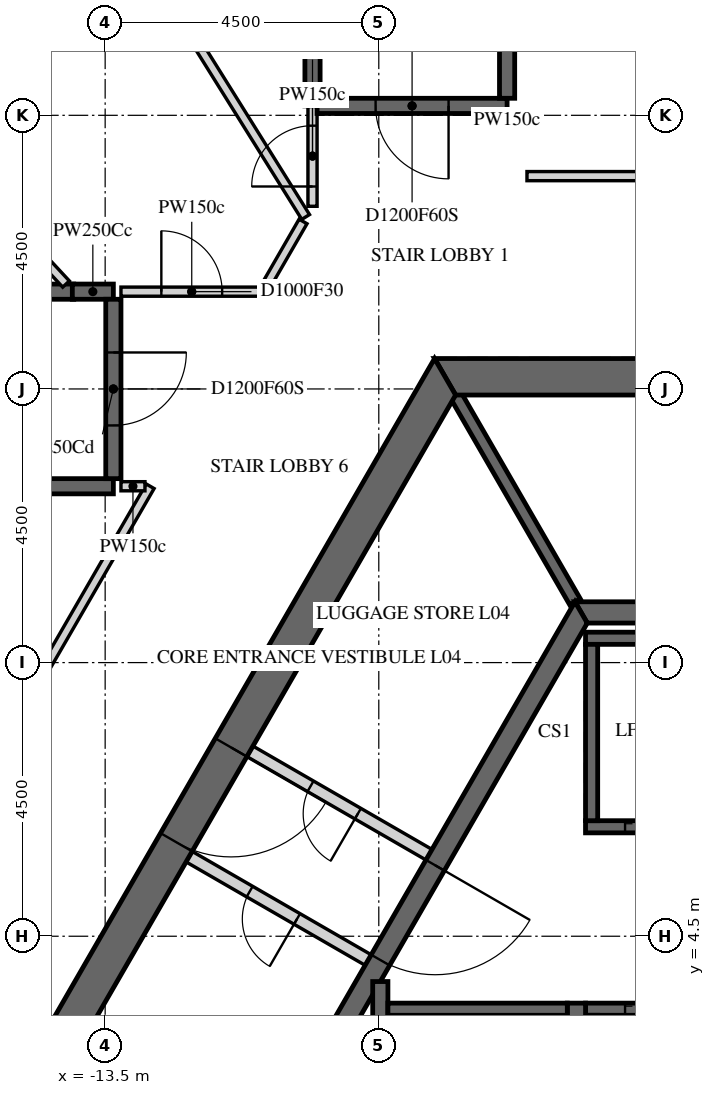
"""IFC4 building model, lengths in metres.
Left out: names, types, materials, properties, quantities, classifications, styles, units other than length and angle.
Written with IfcOpenShell. Run it as: python <this file> out.ifc"""

import sys

from ifc_helpers import new_model, si_unit, direction, frame, frame_2d, origin, place, context, subcontext, project, spatial, polyline, rectangle, outline, extrude, element, fill, save


model = new_model("IFC4")
c1 = context("Model", 3, precision=1e-05, world=origin(), true_north=direction((0.0, 1.0)))
c2 = subcontext(c1, "Body", "Model", "MODEL_VIEW")
j1 = project(units=[si_unit("LENGTHUNIT", "METRE"), si_unit("PLANEANGLEUNIT", "RADIAN")], contexts=[c1])
p1 = place(None, origin())
s1 = spatial("IfcSite", under=j1, at=p1, CompositionType="ELEMENT")
p2 = place(p1, origin())
s2 = spatial("IfcBuilding", under=s1, at=p2, CompositionType="ELEMENT")
p3 = place(p2, frame((0.0, 0.0, 26.0)))
s3 = spatial("IfcBuildingStorey", under=s2, at=p3, CompositionType="ELEMENT", Elevation=26.0)
p4 = place(p3, frame((-7.91, 13.7, -0.25), z_axis=(0.0, 0.0, 1.0), x_axis=(-0.499999880136, -0.866025472988, 0.0)))
e1 = element("IfcWall", 1, at=p4, inside=s3, PredefinedType="SHEAR", context=c2, shape_type="SweptSolid", body=[
    extrude(outline(polyline([(-0.173, -0.3), (15.993, -0.3), (15.646, 0.3), (0.173, 0.3), (-0.173, -0.3)])), origin(), (0.0, 0.0, 1.0), 5.45),
])
p5 = place(p4, frame((7.039, 0.0, 0.25)))
e2 = element("IfcOpeningElement", 2, at=p5, cuts=e1, PredefinedType="OPENING", context=c2, shape_type="SweptSolid", body=[
    extrude(rectangle(XDim=1.8, YDim=2.4, at=frame_2d((0.9, 1.2))), frame((0.0, 0.31, 0.0), z_axis=(0.0, -1.0, 0.0), x_axis=(1.0, 0.0, 0.0)), (0.0, 0.0, 1.0), 0.62),
])
p6 = place(p3, frame((7.91, 13.7, -0.25), z_axis=(0.0, 0.0, 1.0), x_axis=(-1.0, 0.0, 0.0)))
e3 = element("IfcWall", 3, at=p6, inside=s3, PredefinedType="SHEAR", context=c2, shape_type="SweptSolid", body=[
    extrude(outline(polyline([(-0.173, -0.3), (15.993, -0.3), (15.646, 0.3), (0.173, 0.3), (-0.173, -0.3)])), origin(), (0.0, 0.0, 1.0), 5.45),
])
p7 = place(p6, frame((7.31, 0.0, 0.25)))
e4 = element("IfcOpeningElement", 4, at=p7, cuts=e3, PredefinedType="OPENING", context=c2, shape_type="SweptSolid", body=[
    extrude(rectangle(XDim=1.2, YDim=2.4, at=frame_2d((0.6, 1.2))), frame((0.0, 0.31, 0.0), z_axis=(0.0, -1.0, 0.0), x_axis=(1.0, 0.0, 0.0)), (0.0, 0.0, 1.0), 0.62),
])
p8 = place(p3, frame((-5.673, 9.825, -0.25), z_axis=(0.0, 0.0, 1.0), x_axis=(-0.499995046907, -0.866028263435, 0.0)))
e5 = element("IfcWall", 5, at=p8, inside=s3, PredefinedType="SHEAR", context=c2, shape_type="SweptSolid", body=[
    extrude(outline(polyline([(-0.101, -0.175), (11.446, -0.175), (11.244, 0.175), (0.101, 0.175), (-0.101, -0.175)])), origin(), (0.0, 0.0, 1.0), 5.45),
])
p9 = place(p8, frame((4.801, 0.0, 0.25)))
e6 = element("IfcOpeningElement", 6, at=p9, cuts=e5, PredefinedType="OPENING", context=c2, shape_type="SweptSolid", body=[
    extrude(rectangle(XDim=1.8, YDim=2.4, at=frame_2d((0.9, 1.2))), frame((0.0, 0.185, 0.0), z_axis=(0.0, -1.0, 0.0), x_axis=(1.0, 0.0, 0.0)), (0.0, 0.0, 1.0), 0.37),
])
p10 = place(p3, frame((5.673, 9.825, -0.25), z_axis=(0.0, 0.0, 1.0), x_axis=(-1.0, 0.0, 0.0)))
e7 = element("IfcWall", 7, at=p10, inside=s3, PredefinedType="SHEAR", context=c2, shape_type="SweptSolid", body=[
    extrude(outline(polyline([(-0.101, -0.175), (11.446, -0.175), (11.244, 0.175), (0.101, 0.175), (-0.101, -0.175)])), origin(), (0.0, 0.0, 1.0), 5.45),
])
p11 = place(p3, frame((-5.6, 6.3, -0.25), z_axis=(0.0, 0.0, 1.0), x_axis=(1.0, 0.0, 0.0)))
e8 = element("IfcWall", 8, at=p11, inside=s3, PredefinedType="SHEAR", context=c2, shape_type="SweptSolid", body=[
    extrude(rectangle(XDim=11.2, YDim=0.2, at=frame_2d((5.6, 0.0))), origin(), (0.0, 0.0, 1.0), 5.5),
])
p12 = place(p11, frame((0.65, 0.0, 0.25)))
e9 = element("IfcOpeningElement", 9, at=p12, cuts=e8, PredefinedType="OPENING", context=c2, shape_type="SweptSolid", body=[
    extrude(rectangle(XDim=1.1, YDim=2.1, at=frame_2d((0.55, 1.05))), frame((0.0, 0.11, 0.0), z_axis=(0.0, -1.0, 0.0), x_axis=(1.0, 0.0, 0.0)), (0.0, 0.0, 1.0), 0.22),
])
p13 = place(p11, frame((2.85, 0.0, 0.25)))
e10 = element("IfcOpeningElement", 10, at=p13, cuts=e8, PredefinedType="OPENING", context=c2, shape_type="SweptSolid", body=[
    extrude(rectangle(XDim=1.1, YDim=2.1, at=frame_2d((0.55, 1.05))), frame((0.0, 0.11, 0.0), z_axis=(0.0, -1.0, 0.0), x_axis=(1.0, 0.0, 0.0)), (0.0, 0.0, 1.0), 0.22),
])
p14 = place(p11, frame((5.05, 0.0, 0.25)))
e11 = element("IfcOpeningElement", 11, at=p14, cuts=e8, PredefinedType="OPENING", context=c2, shape_type="SweptSolid", body=[
    extrude(rectangle(XDim=1.1, YDim=2.1, at=frame_2d((0.55, 1.05))), frame((0.0, 0.11, 0.0), z_axis=(0.0, -1.0, 0.0), x_axis=(1.0, 0.0, 0.0)), (0.0, 0.0, 1.0), 0.22),
])
p15 = place(p11, frame((7.25, 0.0, 0.25)))
e12 = element("IfcOpeningElement", 12, at=p15, cuts=e8, PredefinedType="OPENING", context=c2, shape_type="SweptSolid", body=[
    extrude(rectangle(XDim=1.1, YDim=2.1, at=frame_2d((0.55, 1.05))), frame((0.0, 0.11, 0.0), z_axis=(0.0, -1.0, 0.0), x_axis=(1.0, 0.0, 0.0)), (0.0, 0.0, 1.0), 0.22),
])
p16 = place(p11, frame((9.45, 0.0, 0.25)))
e13 = element("IfcOpeningElement", 13, at=p16, cuts=e8, PredefinedType="OPENING", context=c2, shape_type="SweptSolid", body=[
    extrude(rectangle(XDim=1.1, YDim=2.1, at=frame_2d((0.55, 1.05))), frame((0.0, 0.11, 0.0), z_axis=(0.0, -1.0, 0.0), x_axis=(1.0, 0.0, 0.0)), (0.0, 0.0, 1.0), 0.22),
])
p17 = place(p3, frame((-5.6, 9.4, -0.25), z_axis=(0.0, 0.0, 1.0), x_axis=(1.0, 0.0, 0.0)))
e14 = element("IfcWall", 14, at=p17, inside=s3, PredefinedType="SHEAR", context=c2, shape_type="SweptSolid", body=[
    extrude(rectangle(XDim=11.2, YDim=0.2, at=frame_2d((5.6, 0.0))), origin(), (0.0, 0.0, 1.0), 5.5),
])
p18 = place(p3, frame((-5.5, 6.4, -0.25), z_axis=(0.0, 0.0, 1.0), x_axis=(0.0, 1.0, 0.0)))
e15 = element("IfcWall", 15, at=p18, inside=s3, PredefinedType="SHEAR", context=c2, shape_type="SweptSolid", body=[
    extrude(rectangle(XDim=2.9, YDim=0.2, at=frame_2d((1.45, 0.0))), origin(), (0.0, 0.0, 1.0), 5.5),
])
p19 = place(p3, frame((-5.6, 3.3, -0.25), z_axis=(0.0, 0.0, 1.0), x_axis=(1.0, 0.0, 0.0)))
e16 = element("IfcWall", 16, at=p19, inside=s3, PredefinedType="SHEAR", context=c2, shape_type="SweptSolid", body=[
    extrude(rectangle(XDim=11.2, YDim=0.2, at=frame_2d((5.6, 0.0))), origin(), (0.0, 0.0, 1.0), 5.5),
])
p20 = place(p19, frame((0.65, 0.0, 0.25)))
e17 = element("IfcOpeningElement", 17, at=p20, cuts=e16, PredefinedType="OPENING", context=c2, shape_type="SweptSolid", body=[
    extrude(rectangle(XDim=1.1, YDim=2.1, at=frame_2d((0.55, 1.05))), frame((0.0, 0.11, 0.0), z_axis=(0.0, -1.0, 0.0), x_axis=(1.0, 0.0, 0.0)), (0.0, 0.0, 1.0), 0.22),
])
p21 = place(p19, frame((2.85, 0.0, 0.25)))
e18 = element("IfcOpeningElement", 18, at=p21, cuts=e16, PredefinedType="OPENING", context=c2, shape_type="SweptSolid", body=[
    extrude(rectangle(XDim=1.1, YDim=2.1, at=frame_2d((0.55, 1.05))), frame((0.0, 0.11, 0.0), z_axis=(0.0, -1.0, 0.0), x_axis=(1.0, 0.0, 0.0)), (0.0, 0.0, 1.0), 0.22),
])
p22 = place(p19, frame((5.05, 0.0, 0.25)))
e19 = element("IfcOpeningElement", 19, at=p22, cuts=e16, PredefinedType="OPENING", context=c2, shape_type="SweptSolid", body=[
    extrude(rectangle(XDim=1.1, YDim=2.1, at=frame_2d((0.55, 1.05))), frame((0.0, 0.11, 0.0), z_axis=(0.0, -1.0, 0.0), x_axis=(1.0, 0.0, 0.0)), (0.0, 0.0, 1.0), 0.22),
])
p23 = place(p19, frame((7.25, 0.0, 0.25)))
e20 = element("IfcOpeningElement", 20, at=p23, cuts=e16, PredefinedType="OPENING", context=c2, shape_type="SweptSolid", body=[
    extrude(rectangle(XDim=1.1, YDim=2.1, at=frame_2d((0.55, 1.05))), frame((0.0, 0.11, 0.0), z_axis=(0.0, -1.0, 0.0), x_axis=(1.0, 0.0, 0.0)), (0.0, 0.0, 1.0), 0.22),
])
p24 = place(p19, frame((9.45, 0.0, 0.25)))
e21 = element("IfcOpeningElement", 21, at=p24, cuts=e16, PredefinedType="OPENING", context=c2, shape_type="SweptSolid", body=[
    extrude(rectangle(XDim=1.1, YDim=2.1, at=frame_2d((0.55, 1.05))), frame((0.0, 0.11, 0.0), z_axis=(0.0, -1.0, 0.0), x_axis=(1.0, 0.0, 0.0)), (0.0, 0.0, 1.0), 0.22),
])
p25 = place(p3, frame((-5.5, 0.1, -0.25), z_axis=(0.0, 0.0, 1.0), x_axis=(0.0, 1.0, 0.0)))
e22 = element("IfcWall", 22, at=p25, inside=s3, PredefinedType="SHEAR", context=c2, shape_type="SweptSolid", body=[
    extrude(rectangle(XDim=3.1, YDim=0.2, at=frame_2d((1.55, 0.0))), origin(), (0.0, 0.0, 1.0), 5.5),
])
p26 = place(p3, frame((-5.773, 10.0, -0.25), z_axis=(0.0, 0.0, 1.0), x_axis=(-0.500038251005, 0.86600331843, 0.0)))
e23 = element("IfcWall", 23, at=p26, inside=s3, PredefinedType="SHEAR", context=c2, shape_type="SweptSolid", body=[
    extrude(rectangle(XDim=3.926, YDim=0.2, at=frame_2d((1.963, 0.0))), origin(), (0.0, 0.0, 1.0), 5.45),
])
p27 = place(p3, frame((-9.175, 4.109, 0.0), z_axis=(0.0, 0.0, 1.0), x_axis=(-0.865989465428, 0.500062241894, 0.0)))
e24 = element("IfcWall", 24, at=p27, inside=s3, PredefinedType="PARTITIONING", context=c2, shape_type="SweptSolid", body=[
    extrude(rectangle(XDim=3.4, YDim=0.2, at=frame_2d((1.7, 0.0))), origin(), (0.0, 0.0, 1.0), 5.25),
])
p28 = place(p27, frame((1.351, 0.0, 0.0)))
e25 = element("IfcOpeningElement", 25, at=p28, cuts=e24, PredefinedType="OPENING", context=c2, shape_type="SweptSolid", body=[
    extrude(rectangle(XDim=0.9, YDim=2.1, at=frame_2d((0.45, 1.05))), frame((0.0, 0.11, 0.0), z_axis=(0.0, -1.0, 0.0), x_axis=(1.0, 0.0, 0.0)), (0.0, 0.0, 1.0), 0.22),
])
p29 = place(p3, frame((-8.175, 5.841, 0.0), z_axis=(0.0, 0.0, 1.0), x_axis=(-0.866020560687, 0.500008388397, 0.0)))
e26 = element("IfcWall", 26, at=p29, inside=s3, PredefinedType="PARTITIONING", context=c2, shape_type="SweptSolid", body=[
    extrude(rectangle(XDim=3.4, YDim=0.2, at=frame_2d((1.7, 0.0))), origin(), (0.0, 0.0, 1.0), 5.25),
])
p30 = place(p29, frame((1.35, 0.0, 0.0)))
e27 = element("IfcOpeningElement", 27, at=p30, cuts=e26, PredefinedType="OPENING", context=c2, shape_type="SweptSolid", body=[
    extrude(rectangle(XDim=0.9, YDim=2.1, at=frame_2d((0.45, 1.05))), frame((0.0, 0.11, 0.0), z_axis=(0.0, -1.0, 0.0), x_axis=(1.0, 0.0, 0.0)), (0.0, 0.0, 1.0), 0.22),
])
p31 = place(p3, frame((-5.75, -3.4, -0.25), z_axis=(0.0, 0.0, 1.0), x_axis=(0.0, 1.0, 0.0)))
e28 = element("IfcWall", 28, at=p31, inside=s3, PredefinedType="SHEAR", context=c2, shape_type="SweptSolid", body=[
    extrude(rectangle(XDim=6.8, YDim=0.3, at=frame_2d((3.4, 0.0))), origin(), (0.0, 0.0, 1.0), 5.5),
])
p32 = place(p3, frame((-8.975, -3.755, -0.25), z_axis=(0.0, 0.0, 1.0), x_axis=(0.0, 1.0, 0.0)))
e29 = element("IfcWall", 29, at=p32, inside=s3, PredefinedType="SHEAR", context=c2, shape_type="SweptSolid", body=[
    extrude(rectangle(XDim=7.51, YDim=0.25, at=frame_2d((3.755, 0.0))), origin(), (0.0, 0.0, 1.0), 5.5),
])
p33 = place(p3, frame((-8.85, 3.3, -0.25), z_axis=(0.0, 0.0, 1.0), x_axis=(1.0, 0.0, 0.0)))
e30 = element("IfcWall", 30, at=p33, inside=s3, PredefinedType="SHEAR", context=c2, shape_type="SweptSolid", body=[
    extrude(rectangle(XDim=2.95, YDim=0.2, at=frame_2d((1.475, 0.0))), origin(), (0.0, 0.0, 1.0), 5.5),
])
p34 = place(p3, frame((-23.51, 15.1, 0.0), z_axis=(0.0, 0.0, 1.0), x_axis=(1.0, 0.0, 0.0)))
e31 = element("IfcWall", 31, at=p34, inside=s3, PredefinedType="PARTITIONING", context=c2, shape_type="SweptSolid", body=[
    extrude(rectangle(XDim=9.493, YDim=0.25, at=frame_2d((4.747, 0.0))), origin(), (0.0, 0.0, 1.0), 4.273),
])
p35 = place(p3, frame((-21.23, 22.854, 0.0), z_axis=(0.0, 0.0, 1.0), x_axis=(0.680602169668, -0.732653183057, 0.0)))
e32 = element("IfcWall", 32, at=p35, inside=s3, PredefinedType="PARTITIONING", context=c2, shape_type="SweptSolid", body=[
    extrude(rectangle(XDim=10.413, YDim=0.15, at=frame_2d((5.206, 0.0))), origin(), (0.0, 0.0, 1.0), 4.273),
])
p36 = place(p3, frame((-17.861, 28.584, 0.0), z_axis=(0.0, 0.0, 1.0), x_axis=(0.529906308886, -0.848056191418, 0.0)))
e33 = element("IfcWall", 33, at=p36, inside=s3, PredefinedType="PARTITIONING", context=c2, shape_type="SweptSolid", body=[
    extrude(rectangle(XDim=14.452, YDim=0.15, at=frame_2d((7.226, 0.0))), origin(), (0.0, 0.0, 1.0), 4.273),
])
p37 = place(p3, frame((-14.04, 15.1, 0.0), z_axis=(0.0, 0.0, 1.0), x_axis=(1.0, 0.0, 0.0)))
e34 = element("IfcWall", 34, at=p37, inside=s3, PredefinedType="PARTITIONING", context=c2, shape_type="SweptSolid", body=[
    extrude(rectangle(XDim=0.675, YDim=0.25, at=frame_2d((0.337, 0.0))), origin(), (0.0, 0.0, 1.0), 5.2),
])
p38 = place(p3, frame((-13.365, 11.9, 0.0), z_axis=(0.0, 0.0, 1.0), x_axis=(-1.0, 0.0, 0.0)))
e35 = element("IfcWall", 35, at=p38, inside=s3, PredefinedType="PARTITIONING", context=c2, shape_type="SweptSolid", body=[
    extrude(rectangle(XDim=10.145, YDim=0.25, at=frame_2d((5.073, 0.0))), origin(), (0.0, 0.0, 1.0), 4.273),
])
p39 = place(p3, frame((-13.365, 14.975, 0.0), z_axis=(0.0, 0.0, 1.0), x_axis=(0.0, -1.0, 0.0)))
e36 = element("IfcWall", 36, at=p39, inside=s3, PredefinedType="PARTITIONING", context=c2, shape_type="SweptSolid", body=[
    extrude(rectangle(XDim=2.95, YDim=0.25, at=frame_2d((1.475, 0.0))), origin(), (0.0, 0.0, 1.0), 4.273),
])
p40 = place(p39, frame((0.875, 0.0, 0.0)))
e37 = element("IfcOpeningElement", 37, at=p40, cuts=e36, PredefinedType="OPENING", context=c2, shape_type="SweptSolid", body=[
    extrude(rectangle(XDim=1.2, YDim=2.1, at=frame_2d((0.6, 1.05))), frame((0.0, 0.135, 0.0), z_axis=(0.0, -1.0, 0.0), x_axis=(1.0, 0.0, 0.0)), (0.0, 0.0, 1.0), 0.27),
])
p41 = place(p3, frame((-13.24, 15.1, 0.0), z_axis=(0.0, 0.0, 1.0), x_axis=(1.0, 0.0, 0.0)))
e38 = element("IfcWall", 38, at=p41, inside=s3, PredefinedType="PARTITIONING", context=c2, shape_type="SweptSolid", body=[
    extrude(rectangle(XDim=2.328, YDim=0.15, at=frame_2d((1.164, 0.0))), origin(), (0.0, 0.0, 1.0), 5.2),
])
p42 = place(p41, frame((0.664, 0.0, 0.0)))
e39 = element("IfcOpeningElement", 39, at=p42, cuts=e38, PredefinedType="OPENING", context=c2, shape_type="SweptSolid", body=[
    extrude(rectangle(XDim=1.0, YDim=2.1, at=frame_2d((0.5, 1.05))), frame((0.0, 0.085, 0.0), z_axis=(0.0, -1.0, 0.0), x_axis=(1.0, 0.0, 0.0)), (0.0, 0.0, 1.0), 0.17),
])
p43 = place(p3, frame((-12.76, 11.9, 0.0), z_axis=(0.0, 0.0, 1.0), x_axis=(-0.50009934258, -0.865968040721, 0.0)))
e40 = element("IfcWall", 40, at=p43, inside=s3, PredefinedType="PARTITIONING", context=c2, shape_type="SweptSolid", body=[
    extrude(rectangle(XDim=3.925, YDim=0.15, at=frame_2d((1.962, 0.0))), origin(), (0.0, 0.0, 1.0), 5.2),
])
p44 = place(p3, frame((-12.846, 11.9, 0.0), z_axis=(0.0, 0.0, 1.0), x_axis=(-1.0, 0.0, 0.0)))
e41 = element("IfcWall", 41, at=p44, inside=s3, PredefinedType="PARTITIONING", context=c2, shape_type="SweptSolid", body=[
    extrude(rectangle(XDim=0.394, YDim=0.15, at=frame_2d((0.197, 0.0))), origin(), (0.0, 0.0, 1.0), 5.2),
])
p45 = place(p3, frame((-10.245, 16.254, 0.0), z_axis=(0.0, 0.0, 1.0), x_axis=(-0.50007851496, -0.865980068405, 0.0)))
e42 = element("IfcWall", 42, at=p45, inside=s3, PredefinedType="PARTITIONING", context=c2, shape_type="SweptSolid", body=[
    extrude(rectangle(XDim=1.246, YDim=0.15, at=frame_2d((0.623, 0.0))), origin(), (0.0, 0.0, 1.0), 5.2),
])
p46 = place(p3, frame((-10.09, 16.504, 0.0), z_axis=(0.0, 0.0, 1.0), x_axis=(0.0, 1.0, 0.0)))
e43 = element("IfcWall", 43, at=p46, inside=s3, PredefinedType="PARTITIONING", context=c2, shape_type="SweptSolid", body=[
    extrude(rectangle(XDim=1.651, YDim=0.15, at=frame_2d((0.826, 0.0))), origin(), (0.0, 0.0, 1.0), 5.2),
])
p47 = place(p46, frame((0.325, 0.0, 0.0)))
e44 = element("IfcOpeningElement", 44, at=p47, cuts=e43, PredefinedType="OPENING", context=c2, shape_type="SweptSolid", body=[
    extrude(rectangle(XDim=1.0, YDim=2.1, at=frame_2d((0.5, 1.05))), frame((0.0, 0.085, 0.0), z_axis=(0.0, -1.0, 0.0), x_axis=(1.0, 0.0, 0.0)), (0.0, 0.0, 1.0), 0.17),
])
p48 = place(p3, frame((-10.09, 18.155, 0.0), z_axis=(0.0, 0.0, 1.0), x_axis=(0.0, 1.0, 0.0)))
e45 = element("IfcWall", 45, at=p48, inside=s3, PredefinedType="PARTITIONING", context=c2, shape_type="SweptSolid", body=[
    extrude(rectangle(XDim=8.006, YDim=0.25, at=frame_2d((4.003, 0.0))), origin(), (0.0, 0.0, 1.0), 4.273),
])
p49 = place(p3, frame((-6.89, 18.155, 0.0), z_axis=(0.0, 0.0, 1.0), x_axis=(-1.0, 0.0, 0.0)))
e46 = element("IfcWall", 46, at=p49, inside=s3, PredefinedType="PARTITIONING", context=c2, shape_type="SweptSolid", body=[
    extrude(rectangle(XDim=3.125, YDim=0.25, at=frame_2d((1.562, 0.0))), origin(), (0.0, 0.0, 1.0), 5.2),
])
p50 = place(p49, frame((0.962, 0.0, 0.0)))
e47 = element("IfcOpeningElement", 47, at=p50, cuts=e46, PredefinedType="OPENING", context=c2, shape_type="SweptSolid", body=[
    extrude(rectangle(XDim=1.2, YDim=2.1, at=frame_2d((0.6, 1.05))), frame((0.0, 0.135, 0.0), z_axis=(0.0, -1.0, 0.0), x_axis=(1.0, 0.0, 0.0)), (0.0, 0.0, 1.0), 0.27),
])
p51 = place(p3, frame((-6.89, 18.03, 0.0), z_axis=(0.0, 0.0, 1.0), x_axis=(0.0, -1.0, 0.0)))
e48 = element("IfcWall", 48, at=p51, inside=s3, PredefinedType="PARTITIONING", context=c2, shape_type="SweptSolid", body=[
    extrude(rectangle(XDim=0.211, YDim=0.15, at=frame_2d((0.105, 0.0))), origin(), (0.0, 0.0, 1.0), 5.2),
])
p52 = place(p3, frame((-6.89, 28.3, 0.0), z_axis=(0.0, 0.0, 1.0), x_axis=(0.0, -1.0, 0.0)))
e49 = element("IfcWall", 49, at=p52, inside=s3, PredefinedType="PARTITIONING", context=c2, shape_type="SweptSolid", body=[
    extrude(rectangle(XDim=10.02, YDim=0.25, at=frame_2d((5.01, 0.0))), origin(), (0.0, 0.0, 1.0), 4.273),
])
p53 = place(p3, frame((-6.563, 17.0, 0.0), z_axis=(0.0, 0.0, 1.0), x_axis=(1.0, 0.0, 0.0)))
e50 = element("IfcWall", 50, at=p53, inside=s3, PredefinedType="PARTITIONING", context=c2, shape_type="SweptSolid", body=[
    extrude(rectangle(XDim=11.711, YDim=0.15, at=frame_2d((5.855, 0.0))), origin(), (0.0, 0.0, 1.0), 5.2),
])
p54 = place(p53, frame((4.956, 0.0, 0.0)))
e51 = element("IfcOpeningElement", 51, at=p54, cuts=e50, PredefinedType="OPENING", context=c2, shape_type="SweptSolid", body=[
    extrude(rectangle(XDim=1.8, YDim=2.1, at=frame_2d((0.9, 1.05))), frame((0.0, 0.085, 0.0), z_axis=(0.0, -1.0, 0.0), x_axis=(1.0, 0.0, 0.0)), (0.0, 0.0, 1.0), 0.17),
])
p55 = place(p5, origin())
e52 = element("IfcDoor", 52, at=p55, inside=s3, OperationType="DOUBLE_DOOR_SINGLE_SWING", PredefinedType="DOOR", context=c2, shape_type="SweptSolid", body=[
    extrude(rectangle(XDim=1.8, YDim=2.4, at=frame_2d((0.9, 1.2))), frame((0.0, 0.025, 0.0), z_axis=(0.0, -1.0, 0.0), x_axis=(1.0, 0.0, 0.0)), (0.0, 0.0, 1.0), 0.05),
])
fill(e2, e52)
p56 = place(p9, origin())
e53 = element("IfcDoor", 53, at=p56, inside=s3, OperationType="DOUBLE_DOOR_SINGLE_SWING", PredefinedType="DOOR", context=c2, shape_type="SweptSolid", body=[
    extrude(rectangle(XDim=1.8, YDim=2.4, at=frame_2d((0.9, 1.2))), frame((0.0, 0.025, 0.0), z_axis=(0.0, -1.0, 0.0), x_axis=(1.0, 0.0, 0.0)), (0.0, 0.0, 1.0), 0.05),
])
fill(e6, e53)
p57 = place(p28, origin())
e54 = element("IfcDoor", 54, at=p57, inside=s3, OperationType="SINGLE_SWING_LEFT", PredefinedType="DOOR", context=c2, shape_type="SweptSolid", body=[
    extrude(rectangle(XDim=0.9, YDim=2.1, at=frame_2d((0.45, 1.05))), frame((0.0, 0.025, 0.0), z_axis=(0.0, -1.0, 0.0), x_axis=(1.0, 0.0, 0.0)), (0.0, 0.0, 1.0), 0.05),
])
fill(e25, e54)
p58 = place(p30, origin())
e55 = element("IfcDoor", 55, at=p58, inside=s3, OperationType="SINGLE_SWING_LEFT", PredefinedType="DOOR", context=c2, shape_type="SweptSolid", body=[
    extrude(rectangle(XDim=0.9, YDim=2.1, at=frame_2d((0.45, 1.05))), frame((0.0, 0.025, 0.0), z_axis=(0.0, -1.0, 0.0), x_axis=(1.0, 0.0, 0.0)), (0.0, 0.0, 1.0), 0.05),
])
fill(e27, e55)
p59 = place(p12, origin())
e56 = element("IfcDoor", 56, at=p59, inside=s3, OperationType="SLIDING_TO_LEFT", PredefinedType="DOOR", context=c2, shape_type="SweptSolid", body=[
    extrude(rectangle(XDim=1.1, YDim=2.1, at=frame_2d((0.55, 1.05))), frame((0.0, 0.025, 0.0), z_axis=(0.0, -1.0, 0.0), x_axis=(1.0, 0.0, 0.0)), (0.0, 0.0, 1.0), 0.05),
])
fill(e9, e56)
p60 = place(p20, origin())
e57 = element("IfcDoor", 57, at=p60, inside=s3, OperationType="SLIDING_TO_LEFT", PredefinedType="DOOR", context=c2, shape_type="SweptSolid", body=[
    extrude(rectangle(XDim=1.1, YDim=2.1, at=frame_2d((0.55, 1.05))), frame((0.0, 0.025, 0.0), z_axis=(0.0, -1.0, 0.0), x_axis=(1.0, 0.0, 0.0)), (0.0, 0.0, 1.0), 0.05),
])
fill(e17, e57)
p61 = place(p40, origin())
e58 = element("IfcDoor", 58, at=p61, inside=s3, OperationType="SINGLE_SWING_LEFT", PredefinedType="DOOR", context=c2, shape_type="SweptSolid", body=[
    extrude(rectangle(XDim=1.2, YDim=2.1, at=frame_2d((0.6, 1.05))), frame((0.0, 0.025, 0.0), z_axis=(0.0, -1.0, 0.0), x_axis=(1.0, 0.0, 0.0)), (0.0, 0.0, 1.0), 0.05),
])
fill(e37, e58)
p62 = place(p42, origin())
e59 = element("IfcDoor", 59, at=p62, inside=s3, OperationType="SINGLE_SWING_RIGHT", PredefinedType="DOOR", context=c2, shape_type="SweptSolid", body=[
    extrude(rectangle(XDim=1.0, YDim=2.1, at=frame_2d((0.5, 1.05))), frame((0.0, 0.025, 0.0), z_axis=(0.0, -1.0, 0.0), x_axis=(1.0, 0.0, 0.0)), (0.0, 0.0, 1.0), 0.05),
])
fill(e39, e59)
p63 = place(p47, origin())
e60 = element("IfcDoor", 60, at=p63, inside=s3, OperationType="SINGLE_SWING_LEFT", PredefinedType="DOOR", context=c2, shape_type="SweptSolid", body=[
    extrude(rectangle(XDim=1.0, YDim=2.1, at=frame_2d((0.5, 1.05))), frame((0.0, 0.025, 0.0), z_axis=(0.0, -1.0, 0.0), x_axis=(1.0, 0.0, 0.0)), (0.0, 0.0, 1.0), 0.05),
])
fill(e44, e60)
p64 = place(p50, origin())
e61 = element("IfcDoor", 61, at=p64, inside=s3, OperationType="SINGLE_SWING_RIGHT", PredefinedType="DOOR", context=c2, shape_type="SweptSolid", body=[
    extrude(rectangle(XDim=1.2, YDim=2.1, at=frame_2d((0.6, 1.05))), frame((0.0, 0.025, 0.0), z_axis=(0.0, -1.0, 0.0), x_axis=(1.0, 0.0, 0.0)), (0.0, 0.0, 1.0), 0.05),
])
fill(e47, e61)
save(model, sys.argv[1])
